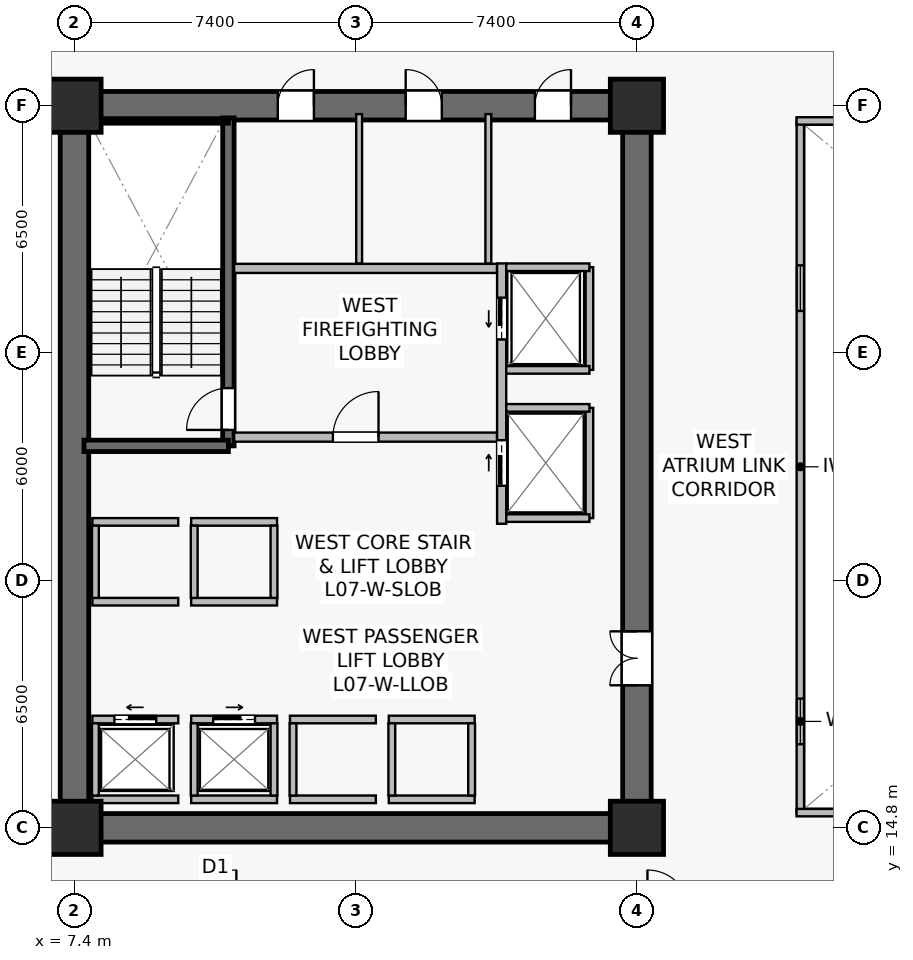
"""IFC4 building model, lengths in metres.
Left out: names, types, materials, properties, quantities, classifications, styles, units other than length and angle.
Written with IfcOpenShell. Run it as: python <this file> out.ifc"""

import sys

from ifc_helpers import new_model, si_unit, direction, frame, frame_2d, origin, origin_2d, place, context, subcontext, project, spatial, rectangle, extrude, source, transform, mapped, element, fill, save


model = new_model("IFC4")
c1 = context("Model", 3, precision=1e-05, world=origin(), true_north=direction((0.0, 1.0)))
c2 = subcontext(c1, "Body", "Model", "MODEL_VIEW")
j1 = project(units=[si_unit("LENGTHUNIT", "METRE"), si_unit("PLANEANGLEUNIT", "RADIAN")], contexts=[c1])
p1 = place(None, origin())
s1 = spatial("IfcSite", under=j1, at=p1, CompositionType="ELEMENT")
p2 = place(p1, origin())
s2 = spatial("IfcBuilding", under=s1, at=p2, CompositionType="ELEMENT")
p3 = place(p2, frame((0.0, 0.0, 29.3)))
s3 = spatial("IfcBuildingStorey", under=s2, at=p3, CompositionType="ELEMENT", Elevation=29.3)
p4 = place(p3, frame((7.025, 14.8, 0.0), z_axis=(0.0, 0.0, 1.0), x_axis=(1.0, 0.0, 0.0)))
e1 = element("IfcWall", 1, at=p4, inside=s3, PredefinedType="SHEAR", context=c2, shape_type="SweptSolid", body=[
    extrude(rectangle(XDim=15.55, YDim=0.75, at=frame_2d((7.775, 0.0))), origin(), (0.0, 0.0, 1.0), 3.78),
])
p5 = place(p3, frame((7.025, 33.8, 0.0), z_axis=(0.0, 0.0, 1.0), x_axis=(1.0, 0.0, 0.0)))
e2 = element("IfcWall", 2, at=p5, inside=s3, PredefinedType="SHEAR", context=c2, shape_type="SweptSolid", body=[
    extrude(rectangle(XDim=15.55, YDim=0.75, at=frame_2d((7.775, 0.0))), origin(), (0.0, 0.0, 1.0), 3.78),
])
p6 = place(p5, frame((5.725, 0.0, 0.0)))
e3 = element("IfcOpeningElement", 3, at=p6, cuts=e2, PredefinedType="OPENING", context=c2, shape_type="SweptSolid", body=[
    extrude(rectangle(XDim=0.95, YDim=2.15, at=frame_2d((0.475, 1.075))), frame((0.0, 0.385, 0.0), z_axis=(0.0, -1.0, 0.0), x_axis=(1.0, 0.0, 0.0)), (0.0, 0.0, 1.0), 0.77),
])
p7 = place(p5, frame((9.09, 0.0, 0.0)))
e4 = element("IfcOpeningElement", 4, at=p7, cuts=e2, PredefinedType="OPENING", context=c2, shape_type="SweptSolid", body=[
    extrude(rectangle(XDim=0.95, YDim=2.15, at=frame_2d((0.475, 1.075))), frame((0.0, 0.385, 0.0), z_axis=(0.0, -1.0, 0.0), x_axis=(1.0, 0.0, 0.0)), (0.0, 0.0, 1.0), 0.77),
])
p8 = place(p5, frame((12.49, 0.0, 0.0)))
e5 = element("IfcOpeningElement", 5, at=p8, cuts=e2, PredefinedType="OPENING", context=c2, shape_type="SweptSolid", body=[
    extrude(rectangle(XDim=0.95, YDim=2.15, at=frame_2d((0.475, 1.075))), frame((0.0, 0.385, 0.0), z_axis=(0.0, -1.0, 0.0), x_axis=(1.0, 0.0, 0.0)), (0.0, 0.0, 1.0), 0.77),
])
p9 = place(p3, frame((7.4, 15.175, 0.0), z_axis=(0.0, 0.0, 1.0), x_axis=(0.0, 1.0, 0.0)))
e6 = element("IfcWall", 6, at=p9, inside=s3, PredefinedType="SHEAR", context=c2, shape_type="SweptSolid", body=[
    extrude(rectangle(XDim=18.25, YDim=0.75, at=frame_2d((9.125, 0.0))), origin(), (0.0, 0.0, 1.0), 3.78),
])
p10 = place(p3, frame((22.2, 15.175, 0.0), z_axis=(0.0, 0.0, 1.0), x_axis=(0.0, 1.0, 0.0)))
e7 = element("IfcWall", 7, at=p10, inside=s3, PredefinedType="SHEAR", context=c2, shape_type="SweptSolid", body=[
    extrude(rectangle(XDim=18.25, YDim=0.75, at=frame_2d((9.125, 0.0))), origin(), (0.0, 0.0, 1.0), 3.78),
])
p11 = place(p10, frame((3.375, 0.0, 0.0)))
e8 = element("IfcOpeningElement", 8, at=p11, cuts=e7, PredefinedType="OPENING", context=c2, shape_type="SweptSolid", body=[
    extrude(rectangle(XDim=1.42, YDim=2.2, at=frame_2d((0.71, 1.1))), frame((0.0, 0.385, 0.0), z_axis=(0.0, -1.0, 0.0), x_axis=(1.0, 0.0, 0.0)), (0.0, 0.0, 1.0), 0.77),
])
p12 = place(p3, frame((11.45, 24.85, 0.0), z_axis=(0.0, 0.0, 1.0), x_axis=(0.0, 1.0, 0.0)))
e9 = element("IfcWall", 9, at=p12, inside=s3, PredefinedType="SHEAR", context=c2, shape_type="SweptSolid", body=[
    extrude(rectangle(XDim=8.63, YDim=0.3, at=frame_2d((4.315, 0.0))), origin(), (0.0, 0.0, 1.0), 3.78),
])
p13 = place(p12, frame((0.42, 0.0, 0.0)))
e10 = element("IfcOpeningElement", 10, at=p13, cuts=e9, PredefinedType="OPENING", context=c2, shape_type="SweptSolid", body=[
    extrude(rectangle(XDim=1.1, YDim=2.15, at=frame_2d((0.55, 1.075))), frame((0.0, 0.16, 0.0), z_axis=(0.0, -1.0, 0.0), x_axis=(1.0, 0.0, 0.0)), (0.0, 0.0, 1.0), 0.32),
])
p14 = place(p3, frame((7.65, 24.85, 0.0), z_axis=(0.0, 0.0, 1.0), x_axis=(1.0, 0.0, 0.0)))
e11 = element("IfcWall", 11, at=p14, inside=s3, PredefinedType="SHEAR", context=c2, shape_type="SweptSolid", body=[
    extrude(rectangle(XDim=3.8, YDim=0.3, at=frame_2d((1.9, 0.0))), origin(), (0.0, 0.0, 1.0), 3.78),
])
p15 = place(p3, frame((7.73, 33.4, 0.0), z_axis=(0.0, 0.0, 1.0), x_axis=(1.0, 0.0, 0.0)))
e12 = element("IfcWall", 12, at=p15, inside=s3, PredefinedType="SOLIDWALL", context=c2, shape_type="SweptSolid", body=[
    extrude(rectangle(XDim=3.72, YDim=0.12, at=frame_2d((1.86, 0.0))), origin(), (0.0, 0.0, 1.0), 3.78),
])
m1 = source(origin(), c2, "Body", "SweptSolid", [
    extrude(rectangle(XDim=1.4, YDim=1.4, at=origin_2d()), origin(), (0.0, 0.0, 1.0), 4.1),
])
for number, where, z_axis, x_axis in (
    (13, (7.4, 14.8, 0.0), (0.0, 0.0, 1.0), (1.0, 0.0, 0.0)),
    (14, (22.2, 14.8, 0.0), (0.0, 0.0, 1.0), (1.0, 0.0, 0.0)),
    (15, (7.4, 33.8, 0.0), (0.0, 0.0, 1.0), (1.0, 0.0, 0.0)),
    (16, (22.2, 33.8, 0.0), (0.0, 0.0, 1.0), (1.0, 0.0, 0.0)),
):
    element("IfcColumn", number, at=place(p3, frame(where, z_axis=z_axis, x_axis=x_axis)), inside=s3, PredefinedType="COLUMN", context=c2, shape_type="MappedRepresentation", body=[
        mapped(m1, transform((0.0, 0.0, 0.0), scale=1.0)),
    ])
p16 = place(p3, frame((11.6, 25.08, 0.0), z_axis=(0.0, 0.0, 1.0), x_axis=(1.0, 0.0, 0.0)))
e17 = element("IfcWall", 17, at=p16, inside=s3, PredefinedType="SOLIDWALL", context=c2, shape_type="SweptSolid", body=[
    extrude(rectangle(XDim=6.92, YDim=0.24, at=frame_2d((3.46, 0.0))), origin(), (0.0, 0.0, 1.0), 3.065),
])
p17 = place(p16, frame((2.6, 0.0, 0.0)))
e18 = element("IfcOpeningElement", 18, at=p17, cuts=e17, PredefinedType="OPENING", context=c2, shape_type="SweptSolid", body=[
    extrude(rectangle(XDim=1.2, YDim=2.16, at=frame_2d((0.6, 1.08))), frame((0.0, 0.13, 0.0), z_axis=(0.0, -1.0, 0.0), x_axis=(1.0, 0.0, 0.0)), (0.0, 0.0, 1.0), 0.26),
])
p18 = place(p3, frame((11.6, 29.52, 0.0), z_axis=(0.0, 0.0, 1.0), x_axis=(1.0, 0.0, 0.0)))
e19 = element("IfcWall", 19, at=p18, inside=s3, PredefinedType="SOLIDWALL", context=c2, shape_type="SweptSolid", body=[
    extrude(rectangle(XDim=6.92, YDim=0.24, at=frame_2d((3.46, 0.0))), origin(), (0.0, 0.0, 1.0), 3.065),
])
p19 = place(p3, frame((18.64, 22.8, 0.0), z_axis=(0.0, 0.0, 1.0), x_axis=(0.0, 1.0, 0.0)))
e20 = element("IfcWall", 20, at=p19, inside=s3, PredefinedType="SOLIDWALL", context=c2, shape_type="SweptSolid", body=[
    extrude(rectangle(XDim=6.85, YDim=0.24, at=frame_2d((3.425, 0.0))), origin(), (0.0, 0.0, 1.0), 2.865),
])
p20 = place(p19, frame((4.85, 0.0, 0.0)))
e21 = element("IfcOpeningElement", 21, at=p20, cuts=e20, PredefinedType="OPENING", context=c2, shape_type="SweptSolid", body=[
    extrude(rectangle(XDim=1.1, YDim=2.22, at=frame_2d((0.55, 1.11))), frame((0.0, 0.13, 0.0), z_axis=(0.0, -1.0, 0.0), x_axis=(1.0, 0.0, 0.0)), (0.0, 0.0, 1.0), 0.26),
])
p21 = place(p19, frame((1.0, 0.0, 0.0)))
e22 = element("IfcOpeningElement", 22, at=p21, cuts=e20, PredefinedType="OPENING", context=c2, shape_type="SweptSolid", body=[
    extrude(rectangle(XDim=1.2, YDim=2.22, at=frame_2d((0.6, 1.11))), frame((0.0, 0.13, 0.0), z_axis=(0.0, -1.0, 0.0), x_axis=(1.0, 0.0, 0.0)), (0.0, 0.0, 1.0), 0.26),
])
p22 = place(p3, frame((7.87, 17.65, 0.0), z_axis=(0.0, 0.0, 1.0), x_axis=(1.0, 0.0, 0.0)))
e23 = element("IfcWall", 23, at=p22, inside=s3, PredefinedType="SOLIDWALL", context=c2, shape_type="SweptSolid", body=[
    extrude(rectangle(XDim=2.26, YDim=0.2, at=frame_2d((1.13, 0.0))), origin(), (0.0, 0.0, 1.0), 3.78),
])
p23 = place(p22, frame((0.58, 0.0, 0.0)))
e24 = element("IfcOpeningElement", 24, at=p23, cuts=e23, PredefinedType="OPENING", context=c2, shape_type="SweptSolid", body=[
    extrude(rectangle(XDim=1.1, YDim=2.22, at=frame_2d((0.55, 1.11))), frame((0.0, 0.11, 0.0), z_axis=(0.0, -1.0, 0.0), x_axis=(1.0, 0.0, 0.0)), (0.0, 0.0, 1.0), 0.22),
])
p24 = place(p3, frame((7.87, 15.55, 0.0), z_axis=(0.0, 0.0, 1.0), x_axis=(1.0, 0.0, 0.0)))
e25 = element("IfcWall", 25, at=p24, inside=s3, PredefinedType="SOLIDWALL", context=c2, shape_type="SweptSolid", body=[
    extrude(rectangle(XDim=2.26, YDim=0.2, at=frame_2d((1.13, 0.0))), origin(), (0.0, 0.0, 1.0), 3.78),
])
p25 = place(p3, frame((7.95, 15.65, 0.0), z_axis=(0.0, 0.0, 1.0), x_axis=(0.0, 1.0, 0.0)))
e26 = element("IfcWall", 26, at=p25, inside=s3, PredefinedType="SOLIDWALL", context=c2, shape_type="SweptSolid", body=[
    extrude(rectangle(XDim=1.9, YDim=0.18, at=frame_2d((0.95, 0.0))), origin(), (0.0, 0.0, 1.0), 3.78),
])
p26 = place(p3, frame((10.47, 17.65, 0.0), z_axis=(0.0, 0.0, 1.0), x_axis=(1.0, 0.0, 0.0)))
e27 = element("IfcWall", 27, at=p26, inside=s3, PredefinedType="SOLIDWALL", context=c2, shape_type="SweptSolid", body=[
    extrude(rectangle(XDim=2.26, YDim=0.2, at=frame_2d((1.13, 0.0))), origin(), (0.0, 0.0, 1.0), 3.78),
])
p27 = place(p26, frame((0.58, 0.0, 0.0)))
e28 = element("IfcOpeningElement", 28, at=p27, cuts=e27, PredefinedType="OPENING", context=c2, shape_type="SweptSolid", body=[
    extrude(rectangle(XDim=1.1, YDim=2.22, at=frame_2d((0.55, 1.11))), frame((0.0, 0.11, 0.0), z_axis=(0.0, -1.0, 0.0), x_axis=(1.0, 0.0, 0.0)), (0.0, 0.0, 1.0), 0.22),
])
p28 = place(p3, frame((10.47, 15.55, 0.0), z_axis=(0.0, 0.0, 1.0), x_axis=(1.0, 0.0, 0.0)))
e29 = element("IfcWall", 29, at=p28, inside=s3, PredefinedType="SOLIDWALL", context=c2, shape_type="SweptSolid", body=[
    extrude(rectangle(XDim=2.26, YDim=0.2, at=frame_2d((1.13, 0.0))), origin(), (0.0, 0.0, 1.0), 3.78),
])
for number, where, z_axis, x_axis in (
    (30, (10.55, 15.65, 0.0), (0.0, 0.0, 1.0), (0.0, 1.0, 0.0)),
    (31, (12.65, 15.65, 0.0), (0.0, 0.0, 1.0), (0.0, 1.0, 0.0)),
):
    element("IfcWall", number, at=place(p3, frame(where, z_axis=z_axis, x_axis=x_axis)), inside=s3, PredefinedType="SOLIDWALL", context=c2, shape_type="SweptSolid", body=[
        extrude(rectangle(XDim=1.9, YDim=0.18, at=frame_2d((0.95, 0.0))), origin(), (0.0, 0.0, 1.0), 3.78),
    ])
for number, where, z_axis, x_axis in (
    (32, (13.07, 17.65, 0.0), (0.0, 0.0, 1.0), (1.0, 0.0, 0.0)),
    (33, (13.07, 15.55, 0.0), (0.0, 0.0, 1.0), (1.0, 0.0, 0.0)),
):
    element("IfcWall", number, at=place(p3, frame(where, z_axis=z_axis, x_axis=x_axis)), inside=s3, PredefinedType="SOLIDWALL", context=c2, shape_type="SweptSolid", body=[
        extrude(rectangle(XDim=2.26, YDim=0.2, at=frame_2d((1.13, 0.0))), origin(), (0.0, 0.0, 1.0), 3.065),
    ])
p29 = place(p3, frame((13.15, 15.65, 0.0), z_axis=(0.0, 0.0, 1.0), x_axis=(0.0, 1.0, 0.0)))
e34 = element("IfcWall", 34, at=p29, inside=s3, PredefinedType="SOLIDWALL", context=c2, shape_type="SweptSolid", body=[
    extrude(rectangle(XDim=1.9, YDim=0.18, at=frame_2d((0.95, 0.0))), origin(), (0.0, 0.0, 1.0), 3.78),
])
for number, where, z_axis, x_axis in (
    (35, (15.67, 17.65, 0.0), (0.0, 0.0, 1.0), (1.0, 0.0, 0.0)),
    (36, (15.67, 15.55, 0.0), (0.0, 0.0, 1.0), (1.0, 0.0, 0.0)),
):
    element("IfcWall", number, at=place(p3, frame(where, z_axis=z_axis, x_axis=x_axis)), inside=s3, PredefinedType="SOLIDWALL", context=c2, shape_type="SweptSolid", body=[
        extrude(rectangle(XDim=2.26, YDim=0.2, at=frame_2d((1.13, 0.0))), origin(), (0.0, 0.0, 1.0), 3.78),
    ])
for number, where, z_axis, x_axis in (
    (37, (15.75, 15.65, 0.0), (0.0, 0.0, 1.0), (0.0, 1.0, 0.0)),
    (38, (17.85, 15.65, 0.0), (0.0, 0.0, 1.0), (0.0, 1.0, 0.0)),
):
    element("IfcWall", number, at=place(p3, frame(where, z_axis=z_axis, x_axis=x_axis)), inside=s3, PredefinedType="SOLIDWALL", context=c2, shape_type="SweptSolid", body=[
        extrude(rectangle(XDim=1.9, YDim=0.18, at=frame_2d((0.95, 0.0))), origin(), (0.0, 0.0, 1.0), 3.78),
    ])
for number, where, z_axis, x_axis in (
    (39, (7.87, 20.75, 0.0), (0.0, 0.0, 1.0), (1.0, 0.0, 0.0)),
    (40, (7.87, 22.85, 0.0), (0.0, 0.0, 1.0), (1.0, 0.0, 0.0)),
):
    element("IfcWall", number, at=place(p3, frame(where, z_axis=z_axis, x_axis=x_axis)), inside=s3, PredefinedType="SOLIDWALL", context=c2, shape_type="SweptSolid", body=[
        extrude(rectangle(XDim=2.26, YDim=0.2, at=frame_2d((1.13, 0.0))), origin(), (0.0, 0.0, 1.0), 3.78),
    ])
p30 = place(p3, frame((7.95, 20.85, 0.0), z_axis=(0.0, 0.0, 1.0), x_axis=(0.0, 1.0, 0.0)))
e41 = element("IfcWall", 41, at=p30, inside=s3, PredefinedType="SOLIDWALL", context=c2, shape_type="SweptSolid", body=[
    extrude(rectangle(XDim=1.9, YDim=0.18, at=frame_2d((0.95, 0.0))), origin(), (0.0, 0.0, 1.0), 3.78),
])
for number, where, z_axis, x_axis in (
    (42, (10.47, 20.75, 0.0), (0.0, 0.0, 1.0), (1.0, 0.0, 0.0)),
    (43, (10.47, 22.85, 0.0), (0.0, 0.0, 1.0), (1.0, 0.0, 0.0)),
):
    element("IfcWall", number, at=place(p3, frame(where, z_axis=z_axis, x_axis=x_axis)), inside=s3, PredefinedType="SOLIDWALL", context=c2, shape_type="SweptSolid", body=[
        extrude(rectangle(XDim=2.26, YDim=0.2, at=frame_2d((1.13, 0.0))), origin(), (0.0, 0.0, 1.0), 3.78),
    ])
for number, where, z_axis, x_axis in (
    (44, (10.55, 20.85, 0.0), (0.0, 0.0, 1.0), (0.0, 1.0, 0.0)),
    (45, (12.65, 20.85, 0.0), (0.0, 0.0, 1.0), (0.0, 1.0, 0.0)),
):
    element("IfcWall", number, at=place(p3, frame(where, z_axis=z_axis, x_axis=x_axis)), inside=s3, PredefinedType="SOLIDWALL", context=c2, shape_type="SweptSolid", body=[
        extrude(rectangle(XDim=1.9, YDim=0.18, at=frame_2d((0.95, 0.0))), origin(), (0.0, 0.0, 1.0), 3.78),
    ])
p31 = place(p3, frame((20.95, 26.85, 0.0), z_axis=(0.0, 0.0, 1.0), x_axis=(0.0, 1.0, 0.0)))
e46 = element("IfcWall", 46, at=p31, inside=s3, PredefinedType="SOLIDWALL", context=c2, shape_type="SweptSolid", body=[
    extrude(rectangle(XDim=2.7, YDim=0.2, at=frame_2d((1.35, 0.0))), origin(), (0.0, 0.0, 1.0), 3.78),
])
p32 = place(p3, frame((18.76, 29.55, 0.0), z_axis=(0.0, 0.0, 1.0), x_axis=(1.0, 0.0, 0.0)))
e47 = element("IfcWall", 47, at=p32, inside=s3, PredefinedType="SOLIDWALL", context=c2, shape_type="SweptSolid", body=[
    extrude(rectangle(XDim=2.19, YDim=0.2, at=frame_2d((1.095, 0.0))), origin(), (0.0, 0.0, 1.0), 3.78),
])
p33 = place(p3, frame((18.76, 26.85, 0.0), z_axis=(0.0, 0.0, 1.0), x_axis=(1.0, 0.0, 0.0)))
e48 = element("IfcWall", 48, at=p33, inside=s3, PredefinedType="SOLIDWALL", context=c2, shape_type="SweptSolid", body=[
    extrude(rectangle(XDim=2.19, YDim=0.2, at=frame_2d((1.095, 0.0))), origin(), (0.0, 0.0, 1.0), 3.177),
])
p34 = place(p3, frame((20.95, 22.95, 0.0), z_axis=(0.0, 0.0, 1.0), x_axis=(0.0, 1.0, 0.0)))
e49 = element("IfcWall", 49, at=p34, inside=s3, PredefinedType="SOLIDWALL", context=c2, shape_type="SweptSolid", body=[
    extrude(rectangle(XDim=2.9, YDim=0.2, at=frame_2d((1.45, 0.0))), origin(), (0.0, 0.0, 1.0), 2.865),
])
for number, where, z_axis, x_axis in (
    (50, (18.76, 25.85, 0.0), (0.0, 0.0, 1.0), (1.0, 0.0, 0.0)),
    (51, (18.76, 22.95, 0.0), (0.0, 0.0, 1.0), (1.0, 0.0, 0.0)),
):
    element("IfcWall", number, at=place(p3, frame(where, z_axis=z_axis, x_axis=x_axis)), inside=s3, PredefinedType="SOLIDWALL", context=c2, shape_type="SweptSolid", body=[
        extrude(rectangle(XDim=2.19, YDim=0.2, at=frame_2d((1.095, 0.0))), origin(), (0.0, 0.0, 1.0), 3.78),
    ])
p35 = place(p3, frame((14.89, 29.65, 0.0), z_axis=(0.0, 0.0, 1.0), x_axis=(0.0, 1.0, 0.0)))
e52 = element("IfcWall", 52, at=p35, inside=s3, PredefinedType="PLUMBINGWALL", context=c2, shape_type="SweptSolid", body=[
    extrude(rectangle(XDim=3.93, YDim=0.155, at=frame_2d((1.965, 0.0))), origin(), (0.0, 0.0, 1.0), 3.065),
])
p36 = place(p3, frame((18.29, 29.65, 0.0), z_axis=(0.0, 0.0, 1.0), x_axis=(0.0, 1.0, 0.0)))
e53 = element("IfcWall", 53, at=p36, inside=s3, PredefinedType="PLUMBINGWALL", context=c2, shape_type="SweptSolid", body=[
    extrude(rectangle(XDim=3.93, YDim=0.155, at=frame_2d((1.965, 0.0))), origin(), (0.0, 0.0, 1.0), 3.78),
])
p37 = place(p3, frame((26.5, 15.2, 0.0), z_axis=(0.0, 0.0, 1.0), x_axis=(0.0, 1.0, 0.0)))
e54 = element("IfcWall", 54, at=p37, inside=s3, PredefinedType="SOLIDWALL", context=c2, shape_type="SweptSolid", body=[
    extrude(rectangle(XDim=18.2, YDim=0.195, at=frame_2d((9.1, 0.0))), origin(), (0.0, 0.0, 1.0), 3.78),
])
p38 = place(p37, frame((1.8, 0.0, 0.9)))
e55 = element("IfcOpeningElement", 55, at=p38, cuts=e54, PredefinedType="OPENING", context=c2, shape_type="SweptSolid", body=[
    extrude(rectangle(XDim=1.2, YDim=1.35, at=frame_2d((0.6, 0.675))), frame((0.0, 0.107, 0.0), z_axis=(0.0, -1.0, 0.0), x_axis=(1.0, 0.0, 0.0)), (0.0, 0.0, 1.0), 0.215),
])
p39 = place(p37, frame((13.2, 0.0, 0.9)))
e56 = element("IfcOpeningElement", 56, at=p39, cuts=e54, PredefinedType="OPENING", context=c2, shape_type="SweptSolid", body=[
    extrude(rectangle(XDim=1.2, YDim=1.35, at=frame_2d((0.6, 0.675))), frame((0.0, 0.107, 0.0), z_axis=(0.0, -1.0, 0.0), x_axis=(1.0, 0.0, 0.0)), (0.0, 0.0, 1.0), 0.215),
])
for number, where, z_axis, x_axis in (
    (57, (26.4, 15.2, 0.0), (0.0, 0.0, 1.0), (1.0, 0.0, 0.0)),
    (58, (26.4, 33.4, 0.0), (0.0, 0.0, 1.0), (1.0, 0.0, 0.0)),
):
    element("IfcWall", number, at=place(p3, frame(where, z_axis=z_axis, x_axis=x_axis)), inside=s3, PredefinedType="SOLIDWALL", context=c2, shape_type="SweptSolid", body=[
        extrude(rectangle(XDim=22.0, YDim=0.195, at=frame_2d((11.0, 0.0))), origin(), (0.0, 0.0, 1.0), 3.78),
    ])
m2 = source(origin(), c2, "Body", "SweptSolid", [
    extrude(rectangle(XDim=1.2, YDim=1.35, at=frame_2d((0.6, 0.675))), frame((0.0, 0.03, 0.0), z_axis=(0.0, -1.0, 0.0), x_axis=(1.0, 0.0, 0.0)), (0.0, 0.0, 1.0), 0.06),
])
p40 = place(p38, origin())
e59 = element("IfcWindow", 59, at=p40, inside=s3, PartitioningType="SINGLE_PANEL", PredefinedType="WINDOW", context=c2, shape_type="MappedRepresentation", body=[
    mapped(m2, transform((0.0, 0.0, 0.0), scale=1.0)),
])
fill(e55, e59)
p41 = place(p39, origin())
e60 = element("IfcWindow", 60, at=p41, inside=s3, PartitioningType="SINGLE_PANEL", PredefinedType="WINDOW", context=c2, shape_type="MappedRepresentation", body=[
    mapped(m2, transform((0.0, 0.0, 0.0), scale=1.0)),
])
fill(e56, e60)
m3 = source(origin(), c2, "Body", "SweptSolid", [
    extrude(rectangle(XDim=1.1, YDim=2.15, at=frame_2d((0.55, 1.075))), frame((0.0, 0.025, 0.0), z_axis=(0.0, -1.0, 0.0), x_axis=(1.0, 0.0, 0.0)), (0.0, 0.0, 1.0), 0.05),
])
p42 = place(p13, origin())
e61 = element("IfcDoor", 61, at=p42, inside=s3, OperationType="SINGLE_SWING_LEFT", PredefinedType="DOOR", context=c2, shape_type="MappedRepresentation", body=[
    mapped(m3, transform((0.0, 0.0, 0.0), scale=1.0)),
])
fill(e10, e61)
m4 = source(origin(), c2, "Body", "SweptSolid", [
    extrude(rectangle(XDim=1.2, YDim=2.16, at=frame_2d((0.6, 1.08))), frame((0.0, 0.025, 0.0), z_axis=(0.0, -1.0, 0.0), x_axis=(1.0, 0.0, 0.0)), (0.0, 0.0, 1.0), 0.05),
])
p43 = place(p17, origin())
e62 = element("IfcDoor", 62, at=p43, inside=s3, OperationType="SINGLE_SWING_RIGHT", PredefinedType="DOOR", context=c2, shape_type="MappedRepresentation", body=[
    mapped(m4, transform((0.0, 0.0, 0.0), scale=1.0)),
])
fill(e18, e62)
m5 = source(origin(), c2, "Body", "SweptSolid", [
    extrude(rectangle(XDim=1.1, YDim=2.22, at=frame_2d((0.55, 1.11))), frame((0.0, 0.025, 0.0), z_axis=(0.0, -1.0, 0.0), x_axis=(1.0, 0.0, 0.0)), (0.0, 0.0, 1.0), 0.05),
])
p44 = place(p23, origin())
e63 = element("IfcDoor", 63, at=p44, inside=s3, OperationType="SLIDING_TO_LEFT", PredefinedType="USERDEFINED", context=c2, shape_type="MappedRepresentation", body=[
    mapped(m5, transform((0.0, 0.0, 0.0), scale=1.0)),
])
fill(e24, e63)
p45 = place(p27, origin())
e64 = element("IfcDoor", 64, at=p45, inside=s3, OperationType="SLIDING_TO_RIGHT", PredefinedType="USERDEFINED", context=c2, shape_type="MappedRepresentation", body=[
    mapped(m5, transform((0.0, 0.0, 0.0), scale=1.0)),
])
fill(e28, e64)
p46 = place(p20, origin())
e65 = element("IfcDoor", 65, at=p46, inside=s3, OperationType="SLIDING_TO_LEFT", PredefinedType="USERDEFINED", context=c2, shape_type="MappedRepresentation", body=[
    mapped(m5, transform((0.0, 0.0, 0.0), scale=1.0)),
])
fill(e21, e65)
m6 = source(origin(), c2, "Body", "SweptSolid", [
    extrude(rectangle(XDim=1.2, YDim=2.22, at=frame_2d((0.6, 1.11))), frame((0.0, 0.025, 0.0), z_axis=(0.0, -1.0, 0.0), x_axis=(1.0, 0.0, 0.0)), (0.0, 0.0, 1.0), 0.05),
])
p47 = place(p21, origin())
e66 = element("IfcDoor", 66, at=p47, inside=s3, OperationType="SLIDING_TO_RIGHT", PredefinedType="USERDEFINED", context=c2, shape_type="MappedRepresentation", body=[
    mapped(m6, transform((0.0, 0.0, 0.0), scale=1.0)),
])
fill(e22, e66)
m7 = source(origin(), c2, "Body", "SweptSolid", [
    extrude(rectangle(XDim=1.42, YDim=2.2, at=frame_2d((0.71, 1.1))), frame((0.0, 0.025, 0.0), z_axis=(0.0, -1.0, 0.0), x_axis=(1.0, 0.0, 0.0)), (0.0, 0.0, 1.0), 0.05),
])
p48 = place(p11, origin())
e67 = element("IfcDoor", 67, at=p48, inside=s3, OperationType="DOUBLE_DOOR_SINGLE_SWING", PredefinedType="DOOR", context=c2, shape_type="MappedRepresentation", body=[
    mapped(m7, transform((0.0, 0.0, 0.0), scale=1.0)),
])
fill(e8, e67)
m8 = source(origin(), c2, "Body", "SweptSolid", [
    extrude(rectangle(XDim=0.95, YDim=2.15, at=frame_2d((0.475, 1.075))), frame((0.0, 0.025, 0.0), z_axis=(0.0, -1.0, 0.0), x_axis=(1.0, 0.0, 0.0)), (0.0, 0.0, 1.0), 0.05),
])
p49 = place(p6, origin())
e68 = element("IfcDoor", 68, at=p49, inside=s3, OperationType="SINGLE_SWING_RIGHT", PredefinedType="DOOR", context=c2, shape_type="MappedRepresentation", body=[
    mapped(m8, transform((0.0, 0.0, 0.0), scale=1.0)),
])
fill(e3, e68)
p50 = place(p7, origin())
e69 = element("IfcDoor", 69, at=p50, inside=s3, OperationType="SINGLE_SWING_LEFT", PredefinedType="DOOR", context=c2, shape_type="MappedRepresentation", body=[
    mapped(m8, transform((0.0, 0.0, 0.0), scale=1.0)),
])
fill(e4, e69)
p51 = place(p8, origin())
e70 = element("IfcDoor", 70, at=p51, inside=s3, OperationType="SINGLE_SWING_RIGHT", PredefinedType="DOOR", context=c2, shape_type="MappedRepresentation", body=[
    mapped(m8, transform((0.0, 0.0, 0.0), scale=1.0)),
])
fill(e5, e70)
save(model, sys.argv[1])
